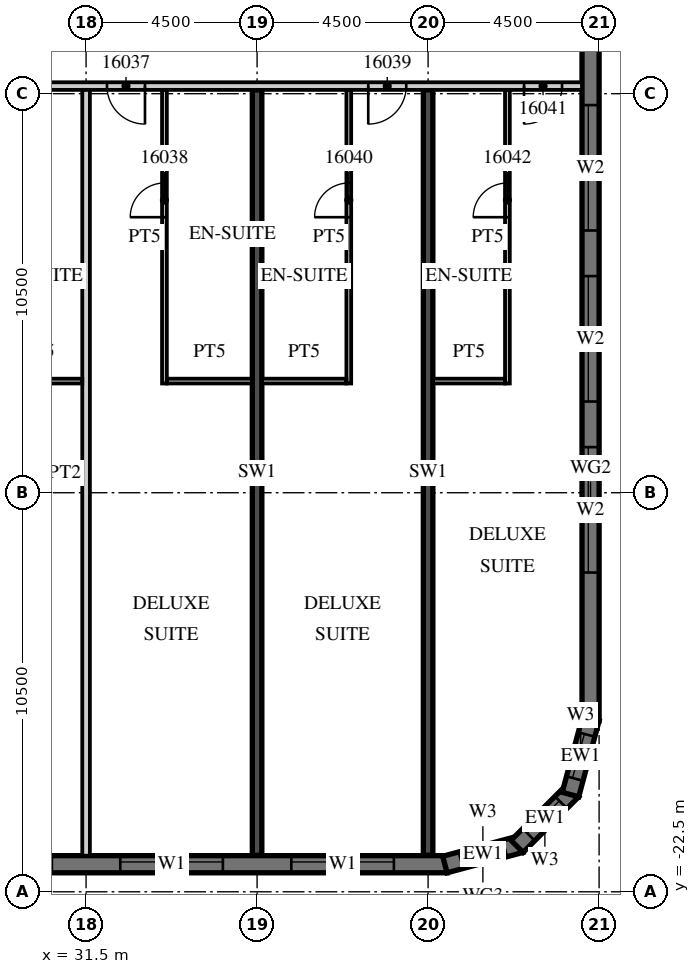
"""IFC4 building model, lengths in metres.
Left out: names, types, materials, properties, quantities, classifications, styles, units other than length and angle.
Written with IfcOpenShell. Run it as: python <this file> out.ifc"""

import sys

from ifc_helpers import new_model, si_unit, direction, frame, frame_2d, origin, place, context, subcontext, project, spatial, polyline, rectangle, outline, extrude, element, fill, save


model = new_model("IFC4")
c1 = context("Model", 3, precision=1e-05, world=origin(), true_north=direction((0.0, 1.0)))
c2 = subcontext(c1, "Body", "Model", "MODEL_VIEW")
j1 = project(units=[si_unit("LENGTHUNIT", "METRE"), si_unit("PLANEANGLEUNIT", "RADIAN")], contexts=[c1])
p1 = place(None, origin())
s1 = spatial("IfcSite", under=j1, at=p1, CompositionType="ELEMENT")
p2 = place(p1, origin())
s2 = spatial("IfcBuilding", under=s1, at=p2, CompositionType="ELEMENT")
p3 = place(p2, frame((0.0, 0.0, 83.1)))
s3 = spatial("IfcBuildingStorey", under=s2, at=p3, CompositionType="ELEMENT", Elevation=83.1)
for number, where, z_axis, x_axis in (
    (1, (36.0, -21.54, 0.0), (0.0, 0.0, 1.0), (0.0, 1.0, 0.0)),
    (2, (40.5, -21.54, 0.0), (0.0, 0.0, 1.0), (0.0, 1.0, 0.0)),
):
    element("IfcWall", number, at=place(p3, frame(where, z_axis=z_axis, x_axis=x_axis)), inside=s3, PredefinedType="SHEAR", context=c2, shape_type="SweptSolid", body=[
        extrude(rectangle(XDim=20.14, YDim=0.25, at=frame_2d((10.07, 0.0))), origin(), (0.0, 0.0, 1.0), 3.3),
    ])
p4 = place(p3, frame((-13.5, -21.775, 0.0), z_axis=(0.0, 0.0, 1.0), x_axis=(1.0, 0.0, 0.0)))
e3 = element("IfcWall", 3, at=p4, inside=s3, PredefinedType="SOLIDWALL", context=c2, shape_type="SweptSolid", body=[
    extrude(rectangle(XDim=54.5, YDim=0.45, at=frame_2d((27.25, 0.0))), origin(), (0.0, 0.0, 1.0), 3.02),
])
p5 = place(p4, frame((0.9, 0.0, 0.45)))
e4 = element("IfcOpeningElement", 4, at=p5, cuts=e3, PredefinedType="OPENING", context=c2, shape_type="SweptSolid", body=[
    extrude(rectangle(XDim=2.7, YDim=2.25, at=frame_2d((1.35, 1.125))), frame((0.0, 0.235, 0.0), z_axis=(0.0, -1.0, 0.0), x_axis=(1.0, 0.0, 0.0)), (0.0, 0.0, 1.0), 0.47),
])
p6 = place(p4, frame((5.4, 0.0, 0.45)))
e5 = element("IfcOpeningElement", 5, at=p6, cuts=e3, PredefinedType="OPENING", context=c2, shape_type="SweptSolid", body=[
    extrude(rectangle(XDim=2.7, YDim=2.25, at=frame_2d((1.35, 1.125))), frame((0.0, 0.235, 0.0), z_axis=(0.0, -1.0, 0.0), x_axis=(1.0, 0.0, 0.0)), (0.0, 0.0, 1.0), 0.47),
])
p7 = place(p4, frame((9.9, 0.0, 0.45)))
e6 = element("IfcOpeningElement", 6, at=p7, cuts=e3, PredefinedType="OPENING", context=c2, shape_type="SweptSolid", body=[
    extrude(rectangle(XDim=2.7, YDim=2.25, at=frame_2d((1.35, 1.125))), frame((0.0, 0.235, 0.0), z_axis=(0.0, -1.0, 0.0), x_axis=(1.0, 0.0, 0.0)), (0.0, 0.0, 1.0), 0.47),
])
p8 = place(p4, frame((14.4, 0.0, 0.45)))
e7 = element("IfcOpeningElement", 7, at=p8, cuts=e3, PredefinedType="OPENING", context=c2, shape_type="SweptSolid", body=[
    extrude(rectangle(XDim=2.7, YDim=2.25, at=frame_2d((1.35, 1.125))), frame((0.0, 0.235, 0.0), z_axis=(0.0, -1.0, 0.0), x_axis=(1.0, 0.0, 0.0)), (0.0, 0.0, 1.0), 0.47),
])
p9 = place(p4, frame((18.9, 0.0, 0.45)))
e8 = element("IfcOpeningElement", 8, at=p9, cuts=e3, PredefinedType="OPENING", context=c2, shape_type="SweptSolid", body=[
    extrude(rectangle(XDim=2.7, YDim=2.25, at=frame_2d((1.35, 1.125))), frame((0.0, 0.235, 0.0), z_axis=(0.0, -1.0, 0.0), x_axis=(1.0, 0.0, 0.0)), (0.0, 0.0, 1.0), 0.47),
])
p10 = place(p4, frame((23.4, 0.0, 0.45)))
e9 = element("IfcOpeningElement", 9, at=p10, cuts=e3, PredefinedType="OPENING", context=c2, shape_type="SweptSolid", body=[
    extrude(rectangle(XDim=2.7, YDim=2.25, at=frame_2d((1.35, 1.125))), frame((0.0, 0.235, 0.0), z_axis=(0.0, -1.0, 0.0), x_axis=(1.0, 0.0, 0.0)), (0.0, 0.0, 1.0), 0.47),
])
p11 = place(p4, frame((27.9, 0.0, 0.45)))
e10 = element("IfcOpeningElement", 10, at=p11, cuts=e3, PredefinedType="OPENING", context=c2, shape_type="SweptSolid", body=[
    extrude(rectangle(XDim=2.7, YDim=2.25, at=frame_2d((1.35, 1.125))), frame((0.0, 0.235, 0.0), z_axis=(0.0, -1.0, 0.0), x_axis=(1.0, 0.0, 0.0)), (0.0, 0.0, 1.0), 0.47),
])
p12 = place(p4, frame((32.4, 0.0, 0.45)))
e11 = element("IfcOpeningElement", 11, at=p12, cuts=e3, PredefinedType="OPENING", context=c2, shape_type="SweptSolid", body=[
    extrude(rectangle(XDim=2.7, YDim=2.25, at=frame_2d((1.35, 1.125))), frame((0.0, 0.235, 0.0), z_axis=(0.0, -1.0, 0.0), x_axis=(1.0, 0.0, 0.0)), (0.0, 0.0, 1.0), 0.47),
])
p13 = place(p4, frame((36.9, 0.0, 0.45)))
e12 = element("IfcOpeningElement", 12, at=p13, cuts=e3, PredefinedType="OPENING", context=c2, shape_type="SweptSolid", body=[
    extrude(rectangle(XDim=2.7, YDim=2.25, at=frame_2d((1.35, 1.125))), frame((0.0, 0.235, 0.0), z_axis=(0.0, -1.0, 0.0), x_axis=(1.0, 0.0, 0.0)), (0.0, 0.0, 1.0), 0.47),
])
p14 = place(p4, frame((41.4, 0.0, 0.45)))
e13 = element("IfcOpeningElement", 13, at=p14, cuts=e3, PredefinedType="OPENING", context=c2, shape_type="SweptSolid", body=[
    extrude(rectangle(XDim=2.7, YDim=2.25, at=frame_2d((1.35, 1.125))), frame((0.0, 0.235, 0.0), z_axis=(0.0, -1.0, 0.0), x_axis=(1.0, 0.0, 0.0)), (0.0, 0.0, 1.0), 0.47),
])
p15 = place(p4, frame((45.9, 0.0, 0.45)))
e14 = element("IfcOpeningElement", 14, at=p15, cuts=e3, PredefinedType="OPENING", context=c2, shape_type="SweptSolid", body=[
    extrude(rectangle(XDim=2.7, YDim=2.25, at=frame_2d((1.35, 1.125))), frame((0.0, 0.235, 0.0), z_axis=(0.0, -1.0, 0.0), x_axis=(1.0, 0.0, 0.0)), (0.0, 0.0, 1.0), 0.47),
])
p16 = place(p4, frame((50.4, 0.0, 0.45)))
e15 = element("IfcOpeningElement", 15, at=p16, cuts=e3, PredefinedType="OPENING", context=c2, shape_type="SweptSolid", body=[
    extrude(rectangle(XDim=2.7, YDim=2.25, at=frame_2d((1.35, 1.125))), frame((0.0, 0.235, 0.0), z_axis=(0.0, -1.0, 0.0), x_axis=(1.0, 0.0, 0.0)), (0.0, 0.0, 1.0), 0.47),
])
p17 = place(p3, frame((40.942, -21.783, 0.0), z_axis=(0.0, 0.0, 1.0), x_axis=(0.965926999034, 0.25881466832, 0.0)))
e16 = element("IfcWall", 16, at=p17, inside=s3, PredefinedType="SOLIDWALL", context=c2, shape_type="SweptSolid", body=[
    extrude(outline(polyline([(0.0, -0.225), (2.071, -0.225), (1.95, 0.225), (0.121, 0.225), (0.0, -0.225)])), origin(), (0.0, 0.0, 1.0), 3.02),
])
p18 = place(p17, frame((0.435, 0.0, 0.45)))
e17 = element("IfcOpeningElement", 17, at=p18, cuts=e16, PredefinedType="OPENING", context=c2, shape_type="SweptSolid", body=[
    extrude(rectangle(XDim=1.2, YDim=2.25, at=frame_2d((0.6, 1.125))), frame((0.0, 0.235, 0.0), z_axis=(0.0, -1.0, 0.0), x_axis=(1.0, 0.0, 0.0)), (0.0, 0.0, 1.0), 0.47),
])
p19 = place(p3, frame((42.841, -21.305, 0.0), z_axis=(0.0, 0.0, 1.0), x_axis=(0.707106781187, 0.707106781187, 0.0)))
e18 = element("IfcWall", 18, at=p19, inside=s3, PredefinedType="SOLIDWALL", context=c2, shape_type="SweptSolid", body=[
    extrude(outline(polyline([(0.0, -0.225), (2.071, -0.225), (1.95, 0.225), (0.121, 0.225), (0.0, -0.225)])), origin(), (0.0, 0.0, 1.0), 3.02),
])
p20 = place(p19, frame((0.435, 0.0, 0.45)))
e19 = element("IfcOpeningElement", 19, at=p20, cuts=e18, PredefinedType="OPENING", context=c2, shape_type="SweptSolid", body=[
    extrude(rectangle(XDim=1.2, YDim=2.25, at=frame_2d((0.6, 1.125))), frame((0.0, 0.235, 0.0), z_axis=(0.0, -1.0, 0.0), x_axis=(1.0, 0.0, 0.0)), (0.0, 0.0, 1.0), 0.47),
])
p21 = place(p3, frame((44.247, -19.942, 0.0), z_axis=(0.0, 0.0, 1.0), x_axis=(0.25881466832, 0.965926999034, 0.0)))
e20 = element("IfcWall", 20, at=p21, inside=s3, PredefinedType="SOLIDWALL", context=c2, shape_type="SweptSolid", body=[
    extrude(outline(polyline([(-0.0, -0.225), (2.07, -0.225), (1.95, 0.225), (0.12, 0.225), (-0.0, -0.225)])), origin(), (0.0, 0.0, 1.0), 3.02),
])
p22 = place(p21, frame((0.435, 0.0, 0.45)))
e21 = element("IfcOpeningElement", 21, at=p22, cuts=e20, PredefinedType="OPENING", context=c2, shape_type="SweptSolid", body=[
    extrude(rectangle(XDim=1.2, YDim=2.25, at=frame_2d((0.6, 1.125))), frame((0.0, 0.235, 0.0), z_axis=(0.0, -1.0, 0.0), x_axis=(1.0, 0.0, 0.0)), (0.0, 0.0, 1.0), 0.47),
])
p23 = place(p3, frame((44.775, -18.0, 0.0), z_axis=(0.0, 0.0, 1.0), x_axis=(0.0, 1.0, 0.0)))
e22 = element("IfcWall", 22, at=p23, inside=s3, PredefinedType="SOLIDWALL", context=c2, shape_type="SweptSolid", body=[
    extrude(rectangle(XDim=36.0, YDim=0.45, at=frame_2d((18.0, 0.0))), origin(), (0.0, 0.0, 1.0), 3.02),
])
p24 = place(p23, frame((3.9, 0.0, 0.45)))
e23 = element("IfcOpeningElement", 23, at=p24, cuts=e22, PredefinedType="OPENING", context=c2, shape_type="SweptSolid", body=[
    extrude(rectangle(XDim=3.3, YDim=2.25, at=frame_2d((1.65, 1.125))), frame((0.0, 0.235, 0.0), z_axis=(0.0, -1.0, 0.0), x_axis=(1.0, 0.0, 0.0)), (0.0, 0.0, 1.0), 0.47),
])
p25 = place(p23, frame((8.4, 0.0, 0.45)))
e24 = element("IfcOpeningElement", 24, at=p25, cuts=e22, PredefinedType="OPENING", context=c2, shape_type="SweptSolid", body=[
    extrude(rectangle(XDim=3.3, YDim=2.25, at=frame_2d((1.65, 1.125))), frame((0.0, 0.235, 0.0), z_axis=(0.0, -1.0, 0.0), x_axis=(1.0, 0.0, 0.0)), (0.0, 0.0, 1.0), 0.47),
])
p26 = place(p23, frame((12.9, 0.0, 0.45)))
e25 = element("IfcOpeningElement", 25, at=p26, cuts=e22, PredefinedType="OPENING", context=c2, shape_type="SweptSolid", body=[
    extrude(rectangle(XDim=3.3, YDim=2.25, at=frame_2d((1.65, 1.125))), frame((0.0, 0.235, 0.0), z_axis=(0.0, -1.0, 0.0), x_axis=(1.0, 0.0, 0.0)), (0.0, 0.0, 1.0), 0.47),
])
p27 = place(p3, frame((-13.5, -1.3, 0.0), z_axis=(0.0, 0.0, 1.0), x_axis=(1.0, 0.0, 0.0)))
e26 = element("IfcWall", 26, at=p27, inside=s3, PredefinedType="PARTITIONING", context=c2, shape_type="SweptSolid", body=[
    extrude(rectangle(XDim=58.05, YDim=0.2, at=frame_2d((29.025, 0.0))), origin(), (0.0, 0.0, 1.0), 3.02),
])
p28 = place(p27, frame((2.925, 0.0, 0.0)))
e27 = element("IfcOpeningElement", 27, at=p28, cuts=e26, PredefinedType="OPENING", context=c2, shape_type="SweptSolid", body=[
    extrude(rectangle(XDim=1.0, YDim=2.1, at=frame_2d((0.5, 1.05))), frame((0.0, 0.11, 0.0), z_axis=(0.0, -1.0, 0.0), x_axis=(1.0, 0.0, 0.0)), (0.0, 0.0, 1.0), 0.22),
])
p29 = place(p27, frame((7.45, 0.0, 0.0)))
e28 = element("IfcOpeningElement", 28, at=p29, cuts=e26, PredefinedType="OPENING", context=c2, shape_type="SweptSolid", body=[
    extrude(rectangle(XDim=1.0, YDim=2.1, at=frame_2d((0.5, 1.05))), frame((0.0, 0.11, 0.0), z_axis=(0.0, -1.0, 0.0), x_axis=(1.0, 0.0, 0.0)), (0.0, 0.0, 1.0), 0.22),
])
p30 = place(p27, frame((11.925, 0.0, 0.0)))
e29 = element("IfcOpeningElement", 29, at=p30, cuts=e26, PredefinedType="OPENING", context=c2, shape_type="SweptSolid", body=[
    extrude(rectangle(XDim=1.0, YDim=2.1, at=frame_2d((0.5, 1.05))), frame((0.0, 0.11, 0.0), z_axis=(0.0, -1.0, 0.0), x_axis=(1.0, 0.0, 0.0)), (0.0, 0.0, 1.0), 0.22),
])
p31 = place(p27, frame((15.938, 0.0, 0.0)))
e30 = element("IfcOpeningElement", 30, at=p31, cuts=e26, PredefinedType="OPENING", context=c2, shape_type="SweptSolid", body=[
    extrude(rectangle(XDim=1.2, YDim=2.1, at=frame_2d((0.6, 1.05))), frame((0.0, 0.11, 0.0), z_axis=(0.0, -1.0, 0.0), x_axis=(1.0, 0.0, 0.0)), (0.0, 0.0, 1.0), 0.22),
])
p32 = place(p27, frame((25.45, 0.0, 0.0)))
e31 = element("IfcOpeningElement", 31, at=p32, cuts=e26, PredefinedType="OPENING", context=c2, shape_type="SweptSolid", body=[
    extrude(rectangle(XDim=1.0, YDim=2.1, at=frame_2d((0.5, 1.05))), frame((0.0, 0.11, 0.0), z_axis=(0.0, -1.0, 0.0), x_axis=(1.0, 0.0, 0.0)), (0.0, 0.0, 1.0), 0.22),
])
p33 = place(p27, frame((29.925, 0.0, 0.0)))
e32 = element("IfcOpeningElement", 32, at=p33, cuts=e26, PredefinedType="OPENING", context=c2, shape_type="SweptSolid", body=[
    extrude(rectangle(XDim=1.0, YDim=2.1, at=frame_2d((0.5, 1.05))), frame((0.0, 0.11, 0.0), z_axis=(0.0, -1.0, 0.0), x_axis=(1.0, 0.0, 0.0)), (0.0, 0.0, 1.0), 0.22),
])
p34 = place(p27, frame((36.862, 0.0, 0.0)))
e33 = element("IfcOpeningElement", 33, at=p34, cuts=e26, PredefinedType="OPENING", context=c2, shape_type="SweptSolid", body=[
    extrude(rectangle(XDim=1.2, YDim=2.1, at=frame_2d((0.6, 1.05))), frame((0.0, 0.11, 0.0), z_axis=(0.0, -1.0, 0.0), x_axis=(1.0, 0.0, 0.0)), (0.0, 0.0, 1.0), 0.22),
])
p35 = place(p27, frame((41.075, 0.0, 0.0)))
e34 = element("IfcOpeningElement", 34, at=p35, cuts=e26, PredefinedType="OPENING", context=c2, shape_type="SweptSolid", body=[
    extrude(rectangle(XDim=1.0, YDim=2.1, at=frame_2d((0.5, 1.05))), frame((0.0, 0.11, 0.0), z_axis=(0.0, -1.0, 0.0), x_axis=(1.0, 0.0, 0.0)), (0.0, 0.0, 1.0), 0.22),
])
p36 = place(p27, frame((45.55, 0.0, 0.0)))
e35 = element("IfcOpeningElement", 35, at=p36, cuts=e26, PredefinedType="OPENING", context=c2, shape_type="SweptSolid", body=[
    extrude(rectangle(XDim=1.0, YDim=2.1, at=frame_2d((0.5, 1.05))), frame((0.0, 0.11, 0.0), z_axis=(0.0, -1.0, 0.0), x_axis=(1.0, 0.0, 0.0)), (0.0, 0.0, 1.0), 0.22),
])
p37 = place(p27, frame((52.425, 0.0, 0.0)))
e36 = element("IfcOpeningElement", 36, at=p37, cuts=e26, PredefinedType="OPENING", context=c2, shape_type="SweptSolid", body=[
    extrude(rectangle(XDim=1.0, YDim=2.1, at=frame_2d((0.5, 1.05))), frame((0.0, 0.11, 0.0), z_axis=(0.0, -1.0, 0.0), x_axis=(1.0, 0.0, 0.0)), (0.0, 0.0, 1.0), 0.22),
])
p38 = place(p27, frame((56.525, 0.0, 0.0)))
e37 = element("IfcOpeningElement", 37, at=p38, cuts=e26, PredefinedType="OPENING", context=c2, shape_type="SweptSolid", body=[
    extrude(rectangle(XDim=1.0, YDim=2.1, at=frame_2d((0.5, 1.05))), frame((0.0, 0.11, 0.0), z_axis=(0.0, -1.0, 0.0), x_axis=(1.0, 0.0, 0.0)), (0.0, 0.0, 1.0), 0.22),
])
p39 = place(p3, frame((31.5, -21.55, 0.0), z_axis=(0.0, 0.0, 1.0), x_axis=(0.0, 1.0, 0.0)))
e38 = element("IfcWall", 38, at=p39, inside=s3, PredefinedType="PARTITIONING", context=c2, shape_type="SweptSolid", body=[
    extrude(rectangle(XDim=20.15, YDim=0.2, at=frame_2d((10.075, 0.0))), origin(), (0.0, 0.0, 1.0), 3.02),
])
p40 = place(p3, frame((29.15, -9.062, 0.0), z_axis=(0.0, 0.0, 1.0), x_axis=(1.0, 0.0, 0.0)))
e39 = element("IfcWall", 39, at=p40, inside=s3, PredefinedType="PARTITIONING", context=c2, shape_type="SweptSolid", body=[
    extrude(rectangle(XDim=2.25, YDim=0.125, at=frame_2d((1.125, 0.0))), origin(), (0.0, 0.0, 1.0), 3.02),
])
p41 = place(p3, frame((33.562, -9.125, 0.0), z_axis=(0.0, 0.0, 1.0), x_axis=(0.0, 1.0, 0.0)))
e40 = element("IfcWall", 40, at=p41, inside=s3, PredefinedType="PARTITIONING", context=c2, shape_type="SweptSolid", body=[
    extrude(rectangle(XDim=7.725, YDim=0.125, at=frame_2d((3.863, 0.0))), origin(), (0.0, 0.0, 1.0), 3.02),
])
p42 = place(p41, frame((4.375, 0.0, 0.0)))
e41 = element("IfcOpeningElement", 41, at=p42, cuts=e40, PredefinedType="OPENING", context=c2, shape_type="SweptSolid", body=[
    extrude(rectangle(XDim=0.9, YDim=2.1, at=frame_2d((0.45, 1.05))), frame((0.0, 0.073, 0.0), z_axis=(0.0, -1.0, 0.0), x_axis=(1.0, 0.0, 0.0)), (0.0, 0.0, 1.0), 0.145),
])
p43 = place(p3, frame((33.625, -9.062, 0.0), z_axis=(0.0, 0.0, 1.0), x_axis=(1.0, 0.0, 0.0)))
e42 = element("IfcWall", 42, at=p43, inside=s3, PredefinedType="PARTITIONING", context=c2, shape_type="SweptSolid", body=[
    extrude(rectangle(XDim=2.25, YDim=0.125, at=frame_2d((1.125, 0.0))), origin(), (0.0, 0.0, 1.0), 3.02),
])
p44 = place(p3, frame((38.413, -9.125, 0.0), z_axis=(0.0, 0.0, 1.0), x_axis=(0.0, 1.0, 0.0)))
e43 = element("IfcWall", 43, at=p44, inside=s3, PredefinedType="PARTITIONING", context=c2, shape_type="SweptSolid", body=[
    extrude(rectangle(XDim=7.725, YDim=0.125, at=frame_2d((3.863, 0.0))), origin(), (0.0, 0.0, 1.0), 3.02),
])
p45 = place(p44, frame((4.375, 0.0, 0.0)))
e44 = element("IfcOpeningElement", 44, at=p45, cuts=e43, PredefinedType="OPENING", context=c2, shape_type="SweptSolid", body=[
    extrude(rectangle(XDim=0.9, YDim=2.1, at=frame_2d((0.45, 1.05))), frame((0.0, 0.073, 0.0), z_axis=(0.0, -1.0, 0.0), x_axis=(1.0, 0.0, 0.0)), (0.0, 0.0, 1.0), 0.145),
])
p46 = place(p3, frame((36.125, -9.062, 0.0), z_axis=(0.0, 0.0, 1.0), x_axis=(1.0, 0.0, 0.0)))
e45 = element("IfcWall", 45, at=p46, inside=s3, PredefinedType="PARTITIONING", context=c2, shape_type="SweptSolid", body=[
    extrude(rectangle(XDim=2.225, YDim=0.125, at=frame_2d((1.113, 0.0))), origin(), (0.0, 0.0, 1.0), 3.02),
])
p47 = place(p3, frame((42.587, -9.125, 0.0), z_axis=(0.0, 0.0, 1.0), x_axis=(0.0, 1.0, 0.0)))
e46 = element("IfcWall", 46, at=p47, inside=s3, PredefinedType="PARTITIONING", context=c2, shape_type="SweptSolid", body=[
    extrude(rectangle(XDim=7.725, YDim=0.125, at=frame_2d((3.863, 0.0))), origin(), (0.0, 0.0, 1.0), 3.02),
])
p48 = place(p47, frame((4.375, 0.0, 0.0)))
e47 = element("IfcOpeningElement", 47, at=p48, cuts=e46, PredefinedType="OPENING", context=c2, shape_type="SweptSolid", body=[
    extrude(rectangle(XDim=0.9, YDim=2.1, at=frame_2d((0.45, 1.05))), frame((0.0, 0.073, 0.0), z_axis=(0.0, -1.0, 0.0), x_axis=(1.0, 0.0, 0.0)), (0.0, 0.0, 1.0), 0.145),
])
p49 = place(p3, frame((40.625, -9.062, 0.0), z_axis=(0.0, 0.0, 1.0), x_axis=(1.0, 0.0, 0.0)))
e48 = element("IfcWall", 48, at=p49, inside=s3, PredefinedType="PARTITIONING", context=c2, shape_type="SweptSolid", body=[
    extrude(rectangle(XDim=1.9, YDim=0.125, at=frame_2d((0.95, 0.0))), origin(), (0.0, 0.0, 1.0), 3.02),
])
p50 = place(p15, origin())
e49 = element("IfcWindow", 49, at=p50, inside=s3, PartitioningType="SINGLE_PANEL", PredefinedType="WINDOW", context=c2, shape_type="SweptSolid", body=[
    extrude(rectangle(XDim=2.7, YDim=2.25, at=frame_2d((1.35, 1.125))), frame((0.0, 0.09, 0.0), z_axis=(0.0, -1.0, 0.0), x_axis=(1.0, 0.0, 0.0)), (0.0, 0.0, 1.0), 0.06),
])
fill(e14, e49)
p51 = place(p16, origin())
e50 = element("IfcWindow", 50, at=p51, inside=s3, PartitioningType="SINGLE_PANEL", PredefinedType="WINDOW", context=c2, shape_type="SweptSolid", body=[
    extrude(rectangle(XDim=2.7, YDim=2.25, at=frame_2d((1.35, 1.125))), frame((0.0, 0.09, 0.0), z_axis=(0.0, -1.0, 0.0), x_axis=(1.0, 0.0, 0.0)), (0.0, 0.0, 1.0), 0.06),
])
fill(e15, e50)
p52 = place(p18, origin())
e51 = element("IfcWindow", 51, at=p52, inside=s3, PartitioningType="SINGLE_PANEL", PredefinedType="WINDOW", context=c2, shape_type="SweptSolid", body=[
    extrude(rectangle(XDim=1.2, YDim=2.25, at=frame_2d((0.6, 1.125))), frame((0.0, 0.09, 0.0), z_axis=(0.0, -1.0, 0.0), x_axis=(1.0, 0.0, 0.0)), (0.0, 0.0, 1.0), 0.06),
])
fill(e17, e51)
p53 = place(p20, origin())
e52 = element("IfcWindow", 52, at=p53, inside=s3, PartitioningType="SINGLE_PANEL", PredefinedType="WINDOW", context=c2, shape_type="SweptSolid", body=[
    extrude(rectangle(XDim=1.2, YDim=2.25, at=frame_2d((0.6, 1.125))), frame((0.0, 0.09, 0.0), z_axis=(0.0, -1.0, 0.0), x_axis=(1.0, 0.0, 0.0)), (0.0, 0.0, 1.0), 0.06),
])
fill(e19, e52)
p54 = place(p22, origin())
e53 = element("IfcWindow", 53, at=p54, inside=s3, PartitioningType="SINGLE_PANEL", PredefinedType="WINDOW", context=c2, shape_type="SweptSolid", body=[
    extrude(rectangle(XDim=1.2, YDim=2.25, at=frame_2d((0.6, 1.125))), frame((0.0, 0.09, 0.0), z_axis=(0.0, -1.0, 0.0), x_axis=(1.0, 0.0, 0.0)), (0.0, 0.0, 1.0), 0.06),
])
fill(e21, e53)
p55 = place(p24, origin())
e54 = element("IfcWindow", 54, at=p55, inside=s3, PartitioningType="SINGLE_PANEL", PredefinedType="WINDOW", context=c2, shape_type="SweptSolid", body=[
    extrude(rectangle(XDim=3.3, YDim=2.25, at=frame_2d((1.65, 1.125))), frame((0.0, 0.09, 0.0), z_axis=(0.0, -1.0, 0.0), x_axis=(1.0, 0.0, 0.0)), (0.0, 0.0, 1.0), 0.06),
])
fill(e23, e54)
p56 = place(p25, origin())
e55 = element("IfcWindow", 55, at=p56, inside=s3, PartitioningType="SINGLE_PANEL", PredefinedType="WINDOW", context=c2, shape_type="SweptSolid", body=[
    extrude(rectangle(XDim=3.3, YDim=2.25, at=frame_2d((1.65, 1.125))), frame((0.0, 0.09, 0.0), z_axis=(0.0, -1.0, 0.0), x_axis=(1.0, 0.0, 0.0)), (0.0, 0.0, 1.0), 0.06),
])
fill(e24, e55)
p57 = place(p26, origin())
e56 = element("IfcWindow", 56, at=p57, inside=s3, PartitioningType="SINGLE_PANEL", PredefinedType="WINDOW", context=c2, shape_type="SweptSolid", body=[
    extrude(rectangle(XDim=3.3, YDim=2.25, at=frame_2d((1.65, 1.125))), frame((0.0, 0.09, 0.0), z_axis=(0.0, -1.0, 0.0), x_axis=(1.0, 0.0, 0.0)), (0.0, 0.0, 1.0), 0.06),
])
fill(e25, e56)
p58 = place(p36, origin())
e57 = element("IfcDoor", 57, at=p58, inside=s3, OperationType="SINGLE_SWING_RIGHT", PredefinedType="DOOR", context=c2, shape_type="SweptSolid", body=[
    extrude(rectangle(XDim=1.0, YDim=2.1, at=frame_2d((0.5, 1.05))), frame((0.0, 0.025, 0.0), z_axis=(0.0, -1.0, 0.0), x_axis=(1.0, 0.0, 0.0)), (0.0, 0.0, 1.0), 0.05),
])
fill(e35, e57)
p59 = place(p42, origin())
e58 = element("IfcDoor", 58, at=p59, inside=s3, OperationType="SINGLE_SWING_LEFT", PredefinedType="DOOR", context=c2, shape_type="SweptSolid", body=[
    extrude(rectangle(XDim=0.9, YDim=2.1, at=frame_2d((0.45, 1.05))), frame((0.0, 0.025, 0.0), z_axis=(0.0, -1.0, 0.0), x_axis=(1.0, 0.0, 0.0)), (0.0, 0.0, 1.0), 0.05),
])
fill(e41, e58)
p60 = place(p37, origin())
e59 = element("IfcDoor", 59, at=p60, inside=s3, OperationType="SINGLE_SWING_LEFT", PredefinedType="DOOR", context=c2, shape_type="SweptSolid", body=[
    extrude(rectangle(XDim=1.0, YDim=2.1, at=frame_2d((0.5, 1.05))), frame((0.0, 0.025, 0.0), z_axis=(0.0, -1.0, 0.0), x_axis=(1.0, 0.0, 0.0)), (0.0, 0.0, 1.0), 0.05),
])
fill(e36, e59)
p61 = place(p45, origin())
e60 = element("IfcDoor", 60, at=p61, inside=s3, OperationType="SINGLE_SWING_LEFT", PredefinedType="DOOR", context=c2, shape_type="SweptSolid", body=[
    extrude(rectangle(XDim=0.9, YDim=2.1, at=frame_2d((0.45, 1.05))), frame((0.0, 0.025, 0.0), z_axis=(0.0, -1.0, 0.0), x_axis=(1.0, 0.0, 0.0)), (0.0, 0.0, 1.0), 0.05),
])
fill(e44, e60)
p62 = place(p38, origin())
e61 = element("IfcDoor", 61, at=p62, inside=s3, OperationType="SINGLE_SWING_LEFT", PredefinedType="DOOR", context=c2, shape_type="SweptSolid", body=[
    extrude(rectangle(XDim=1.0, YDim=2.1, at=frame_2d((0.5, 1.05))), frame((0.0, 0.025, 0.0), z_axis=(0.0, -1.0, 0.0), x_axis=(1.0, 0.0, 0.0)), (0.0, 0.0, 1.0), 0.05),
])
fill(e37, e61)
p63 = place(p48, origin())
e62 = element("IfcDoor", 62, at=p63, inside=s3, OperationType="SINGLE_SWING_LEFT", PredefinedType="DOOR", context=c2, shape_type="SweptSolid", body=[
    extrude(rectangle(XDim=0.9, YDim=2.1, at=frame_2d((0.45, 1.05))), frame((0.0, 0.025, 0.0), z_axis=(0.0, -1.0, 0.0), x_axis=(1.0, 0.0, 0.0)), (0.0, 0.0, 1.0), 0.05),
])
fill(e47, e62)
save(model, sys.argv[1])
